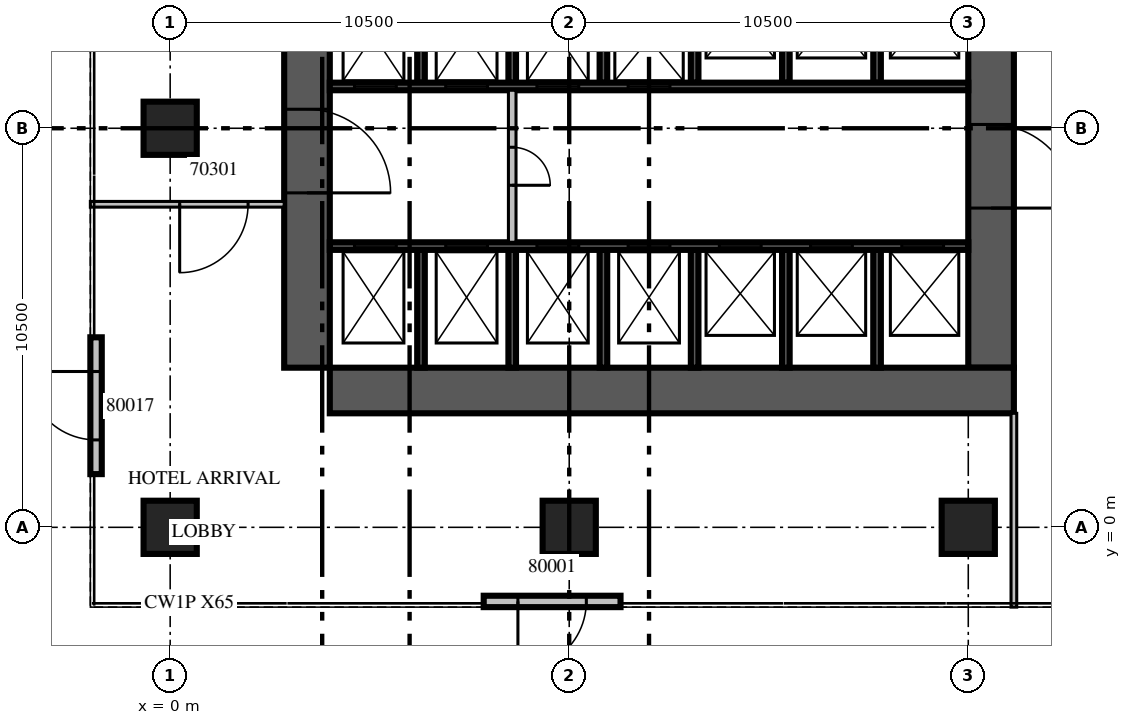
"""IFC4 building model, lengths in metres.
Left out: names, types, materials, properties, quantities, classifications, styles, units other than length and angle.
Written with IfcOpenShell. Run it as: python <this file> out.ifc"""

import sys

from ifc_helpers import new_model, si_unit, direction, frame, frame_2d, origin, origin_with_axes, origin_2d, place, context, subcontext, project, spatial, rectangle, extrude, source, transform, mapped, element, fill, save


model = new_model("IFC4")
c1 = context("Model", 3, precision=1e-05, world=origin(), true_north=direction((0.0, 1.0)))
c2 = subcontext(c1, "Body", "Model", "MODEL_VIEW")
j1 = project(units=[si_unit("LENGTHUNIT", "METRE"), si_unit("PLANEANGLEUNIT", "RADIAN")], contexts=[c1])
p1 = place(None, origin())
s1 = spatial("IfcSite", under=j1, at=p1, CompositionType="ELEMENT")
p2 = place(p1, origin())
s2 = spatial("IfcBuilding", under=s1, at=p2, CompositionType="ELEMENT")
p3 = place(p2, origin())
s3 = spatial("IfcBuildingStorey", under=s2, at=p3, CompositionType="ELEMENT", Elevation=0.0)
p4 = place(p3, origin_with_axes())
e1 = element("IfcColumn", 1, at=p4, inside=s3, PredefinedType="COLUMN", context=c2, shape_type="SweptSolid", body=[
    extrude(rectangle(XDim=1.4, YDim=1.4, at=origin_2d()), origin(), (0.0, 0.0, 1.0), 7.5),
])
m1 = source(origin(), c2, "Body", "SweptSolid", [
    extrude(rectangle(XDim=1.4, YDim=1.4, at=origin_2d()), origin(), (0.0, 0.0, 1.0), 7.5),
])
for number, where, z_axis, x_axis in (
    (2, (0.0, 10.5, 0.0), (0.0, 0.0, 1.0), (1.0, 0.0, 0.0)),
    (3, (10.5, 0.0, 0.0), (0.0, 0.0, 1.0), (1.0, 0.0, 0.0)),
    (4, (21.0, 0.0, 0.0), (0.0, 0.0, 1.0), (1.0, 0.0, 0.0)),
):
    element("IfcColumn", number, at=place(p3, frame(where, z_axis=z_axis, x_axis=x_axis)), inside=s3, PredefinedType="COLUMN", context=c2, shape_type="MappedRepresentation", body=[
        mapped(m1, transform((0.0, 0.0, 0.0), scale=1.0)),
    ])
p5 = place(p3, frame((3.6, 4.2, 0.0), z_axis=(0.0, 0.0, 1.0), x_axis=(0.0, 1.0, 0.0)))
e5 = element("IfcWall", 5, at=p5, inside=s3, PredefinedType="SHEAR", context=c2, shape_type="SweptSolid", body=[
    extrude(rectangle(XDim=18.0, YDim=1.2, at=frame_2d((9.0, 0.0))), origin(), (0.0, 0.0, 1.0), 7.5),
])
m2 = source(origin(), c2, "Body", "SweptSolid", [
    extrude(rectangle(XDim=2.2, YDim=2.1, at=frame_2d((1.1, 1.05))), frame((0.0, 0.61, 0.0), z_axis=(0.0, -1.0, 0.0), x_axis=(1.0, 0.0, 0.0)), (0.0, 0.0, 1.0), 1.22),
])
p6 = place(p5, frame((4.6, 0.0, 0.0)))
e6 = element("IfcOpeningElement", 6, at=p6, cuts=e5, PredefinedType="OPENING", context=c2, shape_type="MappedRepresentation", body=[
    mapped(m2, transform((0.0, 0.0, 0.0), scale=1.0)),
])
p7 = place(p5, frame((10.85, 0.0, 0.0)))
e7 = element("IfcOpeningElement", 7, at=p7, cuts=e5, PredefinedType="OPENING", context=c2, shape_type="SweptSolid", body=[
    extrude(rectangle(XDim=1.1, YDim=2.1, at=frame_2d((0.55, 1.05))), frame((0.0, 0.61, 0.0), z_axis=(0.0, -1.0, 0.0), x_axis=(1.0, 0.0, 0.0)), (0.0, 0.0, 1.0), 1.22),
])
p8 = place(p3, frame((21.6, 4.2, 0.0), z_axis=(0.0, 0.0, 1.0), x_axis=(0.0, 1.0, 0.0)))
e8 = element("IfcWall", 8, at=p8, inside=s3, PredefinedType="SHEAR", context=c2, shape_type="SweptSolid", body=[
    extrude(rectangle(XDim=16.8, YDim=1.2, at=frame_2d((8.4, 0.0))), origin(), (0.0, 0.0, 1.0), 7.5),
])
p9 = place(p8, frame((4.2, 0.0, 0.0)))
e9 = element("IfcOpeningElement", 9, at=p9, cuts=e8, PredefinedType="OPENING", context=c2, shape_type="MappedRepresentation", body=[
    mapped(m2, transform((0.0, 0.0, 0.0), scale=1.0)),
])
m3 = source(origin(), c2, "Body", "SweptSolid", [
    extrude(rectangle(XDim=1.2, YDim=2.1, at=frame_2d((0.6, 1.05))), frame((0.0, 0.61, 0.0), z_axis=(0.0, -1.0, 0.0), x_axis=(1.0, 0.0, 0.0)), (0.0, 0.0, 1.0), 1.22),
])
p10 = place(p8, frame((14.7, 0.0, 0.0)))
e10 = element("IfcOpeningElement", 10, at=p10, cuts=e8, PredefinedType="OPENING", context=c2, shape_type="MappedRepresentation", body=[
    mapped(m3, transform((0.0, 0.0, 0.0), scale=1.0)),
])
m4 = source(origin(), c2, "Body", "SweptSolid", [
    extrude(rectangle(XDim=18.0, YDim=1.2, at=frame_2d((9.0, 0.0))), origin(), (0.0, 0.0, 1.0), 7.5),
])
p11 = place(p3, frame((4.2, 3.6, 0.0), z_axis=(0.0, 0.0, 1.0), x_axis=(1.0, 0.0, 0.0)))
e11 = element("IfcWall", 11, at=p11, inside=s3, PredefinedType="SHEAR", context=c2, shape_type="MappedRepresentation", body=[
    mapped(m4, transform((0.0, 0.0, 0.0), scale=1.0)),
])
p12 = place(p3, frame((8.25, -1.95, 0.0), z_axis=(0.0, 0.0, 1.0), x_axis=(1.0, 0.0, 0.0)))
e12 = element("IfcWall", 12, at=p12, inside=s3, PredefinedType="STANDARD", context=c2, shape_type="SweptSolid", body=[
    extrude(rectangle(XDim=3.6, YDim=0.3, at=frame_2d((1.8, 0.0))), origin(), (0.0, 0.0, 1.0), 6.9),
])
p13 = place(p12, frame((0.9, 0.0, 0.0)))
e13 = element("IfcOpeningElement", 13, at=p13, cuts=e12, PredefinedType="OPENING", context=c2, shape_type="SweptSolid", body=[
    extrude(rectangle(XDim=1.8, YDim=2.4, at=frame_2d((0.9, 1.2))), frame((0.0, 0.16, 0.0), z_axis=(0.0, -1.0, 0.0), x_axis=(1.0, 0.0, 0.0)), (0.0, 0.0, 1.0), 0.32),
])
m5 = source(origin(), c2, "Body", "SweptSolid", [
    extrude(rectangle(XDim=3.6, YDim=0.3, at=frame_2d((1.8, 0.0))), origin(), (0.0, 0.0, 1.0), 6.9),
])
p14 = place(p3, frame((-1.95, 5.0, 0.0), z_axis=(0.0, 0.0, 1.0), x_axis=(0.0, -1.0, 0.0)))
e14 = element("IfcWall", 14, at=p14, inside=s3, PredefinedType="STANDARD", context=c2, shape_type="MappedRepresentation", body=[
    mapped(m5, transform((0.0, 0.0, 0.0), scale=1.0)),
])
m6 = source(origin(), c2, "Body", "SweptSolid", [
    extrude(rectangle(XDim=1.8, YDim=2.4, at=frame_2d((0.9, 1.2))), frame((0.0, 0.16, 0.0), z_axis=(0.0, -1.0, 0.0), x_axis=(1.0, 0.0, 0.0)), (0.0, 0.0, 1.0), 0.32),
])
p15 = place(p14, frame((0.9, 0.0, 0.0)))
e15 = element("IfcOpeningElement", 15, at=p15, cuts=e14, PredefinedType="OPENING", context=c2, shape_type="MappedRepresentation", body=[
    mapped(m6, transform((0.0, 0.0, 0.0), scale=1.0)),
])
p16 = place(p3, frame((6.6, 4.2, 0.0), z_axis=(0.0, 0.0, 1.0), x_axis=(0.0, 1.0, 0.0)))
e16 = element("IfcWall", 16, at=p16, inside=s3, PredefinedType="SOLIDWALL", context=c2, shape_type="SweptSolid", body=[
    extrude(rectangle(XDim=3.1, YDim=0.2, at=frame_2d((1.55, 0.0))), origin(), (0.0, 0.0, 1.0), 7.5),
])
m7 = source(origin(), c2, "Body", "SweptSolid", [
    extrude(rectangle(XDim=3.1, YDim=0.2, at=frame_2d((1.55, 0.0))), origin(), (0.0, 0.0, 1.0), 7.5),
])
for number, where, z_axis, x_axis in (
    (17, (9.0, 4.2, 0.0), (0.0, 0.0, 1.0), (0.0, 1.0, 0.0)),
    (18, (11.4, 4.2, 0.0), (0.0, 0.0, 1.0), (0.0, 1.0, 0.0)),
    (19, (13.8, 4.2, 0.0), (0.0, 0.0, 1.0), (0.0, 1.0, 0.0)),
    (20, (16.2, 4.2, 0.0), (0.0, 0.0, 1.0), (0.0, 1.0, 0.0)),
    (21, (18.6, 4.2, 0.0), (0.0, 0.0, 1.0), (0.0, 1.0, 0.0)),
):
    element("IfcWall", number, at=place(p3, frame(where, z_axis=z_axis, x_axis=x_axis)), inside=s3, PredefinedType="SOLIDWALL", context=c2, shape_type="MappedRepresentation", body=[
        mapped(m7, transform((0.0, 0.0, 0.0), scale=1.0)),
    ])
p17 = place(p3, frame((6.6, 11.7, 0.0), z_axis=(0.0, 0.0, 1.0), x_axis=(0.0, 1.0, 0.0)))
e22 = element("IfcWall", 22, at=p17, inside=s3, PredefinedType="SOLIDWALL", context=c2, shape_type="SweptSolid", body=[
    extrude(rectangle(XDim=3.0, YDim=0.2, at=frame_2d((1.5, 0.0))), origin(), (0.0, 0.0, 1.0), 7.5),
])
m8 = source(origin(), c2, "Body", "SweptSolid", [
    extrude(rectangle(XDim=3.0, YDim=0.2, at=frame_2d((1.5, 0.0))), origin(), (0.0, 0.0, 1.0), 7.5),
])
for number, where, z_axis, x_axis in (
    (23, (9.0, 11.7, 0.0), (0.0, 0.0, 1.0), (0.0, 1.0, 0.0)),
    (24, (11.4, 11.7, 0.0), (0.0, 0.0, 1.0), (0.0, 1.0, 0.0)),
    (25, (13.8, 11.7, 0.0), (0.0, 0.0, 1.0), (0.0, 1.0, 0.0)),
    (26, (16.2, 11.7, 0.0), (0.0, 0.0, 1.0), (0.0, 1.0, 0.0)),
    (27, (18.6, 11.7, 0.0), (0.0, 0.0, 1.0), (0.0, 1.0, 0.0)),
):
    element("IfcWall", number, at=place(p3, frame(where, z_axis=z_axis, x_axis=x_axis)), inside=s3, PredefinedType="SOLIDWALL", context=c2, shape_type="MappedRepresentation", body=[
        mapped(m8, transform((0.0, 0.0, 0.0), scale=1.0)),
    ])
p18 = place(p3, frame((4.2, 7.4, 0.0), z_axis=(0.0, 0.0, 1.0), x_axis=(1.0, 0.0, 0.0)))
e28 = element("IfcWall", 28, at=p18, inside=s3, PredefinedType="SOLIDWALL", context=c2, shape_type="SweptSolid", body=[
    extrude(rectangle(XDim=16.8, YDim=0.2, at=frame_2d((8.4, 0.0))), origin(), (0.0, 0.0, 1.0), 7.5),
])
m9 = source(origin(), c2, "Body", "SweptSolid", [
    extrude(rectangle(XDim=1.1, YDim=2.1, at=frame_2d((0.55, 1.05))), frame((0.0, 0.11, 0.0), z_axis=(0.0, -1.0, 0.0), x_axis=(1.0, 0.0, 0.0)), (0.0, 0.0, 1.0), 0.22),
])
p19 = place(p18, frame((0.65, 0.0, 0.0)))
e29 = element("IfcOpeningElement", 29, at=p19, cuts=e28, PredefinedType="OPENING", context=c2, shape_type="MappedRepresentation", body=[
    mapped(m9, transform((0.0, 0.0, 0.0), scale=1.0)),
])
p20 = place(p18, frame((3.05, 0.0, 0.0)))
e30 = element("IfcOpeningElement", 30, at=p20, cuts=e28, PredefinedType="OPENING", context=c2, shape_type="MappedRepresentation", body=[
    mapped(m9, transform((0.0, 0.0, 0.0), scale=1.0)),
])
p21 = place(p18, frame((5.45, 0.0, 0.0)))
e31 = element("IfcOpeningElement", 31, at=p21, cuts=e28, PredefinedType="OPENING", context=c2, shape_type="MappedRepresentation", body=[
    mapped(m9, transform((0.0, 0.0, 0.0), scale=1.0)),
])
p22 = place(p18, frame((7.85, 0.0, 0.0)))
e32 = element("IfcOpeningElement", 32, at=p22, cuts=e28, PredefinedType="OPENING", context=c2, shape_type="MappedRepresentation", body=[
    mapped(m9, transform((0.0, 0.0, 0.0), scale=1.0)),
])
p23 = place(p18, frame((10.25, 0.0, 0.0)))
e33 = element("IfcOpeningElement", 33, at=p23, cuts=e28, PredefinedType="OPENING", context=c2, shape_type="MappedRepresentation", body=[
    mapped(m9, transform((0.0, 0.0, 0.0), scale=1.0)),
])
p24 = place(p18, frame((12.65, 0.0, 0.0)))
e34 = element("IfcOpeningElement", 34, at=p24, cuts=e28, PredefinedType="OPENING", context=c2, shape_type="MappedRepresentation", body=[
    mapped(m9, transform((0.0, 0.0, 0.0), scale=1.0)),
])
p25 = place(p18, frame((15.05, 0.0, 0.0)))
e35 = element("IfcOpeningElement", 35, at=p25, cuts=e28, PredefinedType="OPENING", context=c2, shape_type="MappedRepresentation", body=[
    mapped(m9, transform((0.0, 0.0, 0.0), scale=1.0)),
])
m10 = source(origin(), c2, "Body", "SweptSolid", [
    extrude(rectangle(XDim=16.8, YDim=0.2, at=frame_2d((8.4, 0.0))), origin(), (0.0, 0.0, 1.0), 7.5),
])
p26 = place(p3, frame((4.2, 11.6, 0.0), z_axis=(0.0, 0.0, 1.0), x_axis=(1.0, 0.0, 0.0)))
e36 = element("IfcWall", 36, at=p26, inside=s3, PredefinedType="SOLIDWALL", context=c2, shape_type="MappedRepresentation", body=[
    mapped(m10, transform((0.0, 0.0, 0.0), scale=1.0)),
])
p27 = place(p26, frame((0.65, 0.0, 0.0)))
e37 = element("IfcOpeningElement", 37, at=p27, cuts=e36, PredefinedType="OPENING", context=c2, shape_type="MappedRepresentation", body=[
    mapped(m9, transform((0.0, 0.0, 0.0), scale=1.0)),
])
p28 = place(p26, frame((3.05, 0.0, 0.0)))
e38 = element("IfcOpeningElement", 38, at=p28, cuts=e36, PredefinedType="OPENING", context=c2, shape_type="MappedRepresentation", body=[
    mapped(m9, transform((0.0, 0.0, 0.0), scale=1.0)),
])
p29 = place(p26, frame((5.45, 0.0, 0.0)))
e39 = element("IfcOpeningElement", 39, at=p29, cuts=e36, PredefinedType="OPENING", context=c2, shape_type="MappedRepresentation", body=[
    mapped(m9, transform((0.0, 0.0, 0.0), scale=1.0)),
])
p30 = place(p26, frame((7.85, 0.0, 0.0)))
e40 = element("IfcOpeningElement", 40, at=p30, cuts=e36, PredefinedType="OPENING", context=c2, shape_type="MappedRepresentation", body=[
    mapped(m9, transform((0.0, 0.0, 0.0), scale=1.0)),
])
p31 = place(p3, frame((9.0, 7.5, 0.0), z_axis=(0.0, 0.0, 1.0), x_axis=(0.0, 1.0, 0.0)))
e41 = element("IfcWall", 41, at=p31, inside=s3, PredefinedType="PARTITIONING", context=c2, shape_type="SweptSolid", body=[
    extrude(rectangle(XDim=4.0, YDim=0.2, at=frame_2d((2.0, 0.0))), origin(), (0.0, 0.0, 1.0), 6.9),
])
p32 = place(p31, frame((1.5, 0.0, 0.0)))
e42 = element("IfcOpeningElement", 42, at=p32, cuts=e41, PredefinedType="OPENING", context=c2, shape_type="SweptSolid", body=[
    extrude(rectangle(XDim=1.0, YDim=2.1, at=frame_2d((0.5, 1.05))), frame((0.0, 0.11, 0.0), z_axis=(0.0, -1.0, 0.0), x_axis=(1.0, 0.0, 0.0)), (0.0, 0.0, 1.0), 0.22),
])
p33 = place(p3, frame((-2.1, 8.5, 0.0), z_axis=(0.0, 0.0, 1.0), x_axis=(1.0, 0.0, 0.0)))
e43 = element("IfcWall", 43, at=p33, inside=s3, PredefinedType="PARTITIONING", context=c2, shape_type="SweptSolid", body=[
    extrude(rectangle(XDim=5.1, YDim=0.15, at=frame_2d((2.55, 0.0))), origin(), (0.0, 0.0, 1.0), 6.9),
])
p34 = place(p33, frame((2.35, 0.0, 0.0)))
e44 = element("IfcOpeningElement", 44, at=p34, cuts=e43, PredefinedType="OPENING", context=c2, shape_type="SweptSolid", body=[
    extrude(rectangle(XDim=1.8, YDim=2.1, at=frame_2d((0.9, 1.05))), frame((0.0, 0.085, 0.0), z_axis=(0.0, -1.0, 0.0), x_axis=(1.0, 0.0, 0.0)), (0.0, 0.0, 1.0), 0.17),
])
m11 = source(origin(), c2, "Body", "SweptSolid", [
    extrude(rectangle(XDim=5.1, YDim=0.15, at=frame_2d((2.55, 0.0))), origin(), (0.0, 0.0, 1.0), 6.9),
])
p35 = place(p3, frame((22.2, -2.1, 0.0), z_axis=(0.0, 0.0, 1.0), x_axis=(0.0, 1.0, 0.0)))
e45 = element("IfcWall", 45, at=p35, inside=s3, PredefinedType="PARTITIONING", context=c2, shape_type="MappedRepresentation", body=[
    mapped(m11, transform((0.0, 0.0, 0.0), scale=1.0)),
])
p36 = place(p13, origin())
e46 = element("IfcDoor", 46, at=p36, inside=s3, OperationType="DOUBLE_DOOR_SINGLE_SWING", PredefinedType="DOOR", context=c2, shape_type="SweptSolid", body=[
    extrude(rectangle(XDim=1.8, YDim=2.4, at=frame_2d((0.9, 1.2))), frame((0.0, 0.025, 0.0), z_axis=(0.0, -1.0, 0.0), x_axis=(1.0, 0.0, 0.0)), (0.0, 0.0, 1.0), 0.05),
])
fill(e13, e46)
m12 = source(origin(), c2, "Body", "SweptSolid", [
    extrude(rectangle(XDim=1.8, YDim=2.4, at=frame_2d((0.9, 1.2))), frame((0.0, 0.025, 0.0), z_axis=(0.0, -1.0, 0.0), x_axis=(1.0, 0.0, 0.0)), (0.0, 0.0, 1.0), 0.05),
])
p37 = place(p15, origin())
e47 = element("IfcDoor", 47, at=p37, inside=s3, OperationType="DOUBLE_DOOR_SINGLE_SWING", PredefinedType="DOOR", context=c2, shape_type="MappedRepresentation", body=[
    mapped(m12, transform((0.0, 0.0, 0.0), scale=1.0)),
])
fill(e15, e47)
m13 = source(origin(), c2, "Body", "SweptSolid", [
    extrude(rectangle(XDim=1.1, YDim=2.1, at=frame_2d((0.55, 1.05))), frame((0.0, 0.025, 0.0), z_axis=(0.0, -1.0, 0.0), x_axis=(1.0, 0.0, 0.0)), (0.0, 0.0, 1.0), 0.05),
])
p38 = place(p19, origin())
e48 = element("IfcDoor", 48, at=p38, inside=s3, OperationType="SLIDING_TO_LEFT", PredefinedType="DOOR", context=c2, shape_type="MappedRepresentation", body=[
    mapped(m13, transform((0.0, 0.0, 0.0), scale=1.0)),
])
fill(e29, e48)
p39 = place(p20, origin())
e49 = element("IfcDoor", 49, at=p39, inside=s3, OperationType="SLIDING_TO_LEFT", PredefinedType="DOOR", context=c2, shape_type="MappedRepresentation", body=[
    mapped(m13, transform((0.0, 0.0, 0.0), scale=1.0)),
])
fill(e30, e49)
p40 = place(p21, origin())
e50 = element("IfcDoor", 50, at=p40, inside=s3, OperationType="SLIDING_TO_LEFT", PredefinedType="DOOR", context=c2, shape_type="MappedRepresentation", body=[
    mapped(m13, transform((0.0, 0.0, 0.0), scale=1.0)),
])
fill(e31, e50)
p41 = place(p22, origin())
e51 = element("IfcDoor", 51, at=p41, inside=s3, OperationType="SLIDING_TO_LEFT", PredefinedType="DOOR", context=c2, shape_type="MappedRepresentation", body=[
    mapped(m13, transform((0.0, 0.0, 0.0), scale=1.0)),
])
fill(e32, e51)
p42 = place(p23, origin())
e52 = element("IfcDoor", 52, at=p42, inside=s3, OperationType="SLIDING_TO_LEFT", PredefinedType="DOOR", context=c2, shape_type="MappedRepresentation", body=[
    mapped(m13, transform((0.0, 0.0, 0.0), scale=1.0)),
])
fill(e33, e52)
p43 = place(p24, origin())
e53 = element("IfcDoor", 53, at=p43, inside=s3, OperationType="SLIDING_TO_LEFT", PredefinedType="DOOR", context=c2, shape_type="MappedRepresentation", body=[
    mapped(m13, transform((0.0, 0.0, 0.0), scale=1.0)),
])
fill(e34, e53)
p44 = place(p25, origin())
e54 = element("IfcDoor", 54, at=p44, inside=s3, OperationType="SLIDING_TO_LEFT", PredefinedType="DOOR", context=c2, shape_type="MappedRepresentation", body=[
    mapped(m13, transform((0.0, 0.0, 0.0), scale=1.0)),
])
fill(e35, e54)
p45 = place(p27, origin())
e55 = element("IfcDoor", 55, at=p45, inside=s3, OperationType="SLIDING_TO_LEFT", PredefinedType="DOOR", context=c2, shape_type="MappedRepresentation", body=[
    mapped(m13, transform((0.0, 0.0, 0.0), scale=1.0)),
])
fill(e37, e55)
p46 = place(p28, origin())
e56 = element("IfcDoor", 56, at=p46, inside=s3, OperationType="SLIDING_TO_LEFT", PredefinedType="DOOR", context=c2, shape_type="MappedRepresentation", body=[
    mapped(m13, transform((0.0, 0.0, 0.0), scale=1.0)),
])
fill(e38, e56)
p47 = place(p29, origin())
e57 = element("IfcDoor", 57, at=p47, inside=s3, OperationType="SLIDING_TO_LEFT", PredefinedType="DOOR", context=c2, shape_type="MappedRepresentation", body=[
    mapped(m13, transform((0.0, 0.0, 0.0), scale=1.0)),
])
fill(e39, e57)
p48 = place(p30, origin())
e58 = element("IfcDoor", 58, at=p48, inside=s3, OperationType="SLIDING_TO_LEFT", PredefinedType="DOOR", context=c2, shape_type="MappedRepresentation", body=[
    mapped(m13, transform((0.0, 0.0, 0.0), scale=1.0)),
])
fill(e40, e58)
m14 = source(origin(), c2, "Body", "SweptSolid", [
    extrude(rectangle(XDim=1.0, YDim=2.1, at=frame_2d((0.5, 1.05))), frame((0.0, 0.025, 0.0), z_axis=(0.0, -1.0, 0.0), x_axis=(1.0, 0.0, 0.0)), (0.0, 0.0, 1.0), 0.05),
])
p49 = place(p32, origin())
e59 = element("IfcDoor", 59, at=p49, inside=s3, OperationType="SINGLE_SWING_RIGHT", PredefinedType="DOOR", context=c2, shape_type="MappedRepresentation", body=[
    mapped(m14, transform((0.0, 0.0, 0.0), scale=1.0)),
])
fill(e42, e59)
m15 = source(origin(), c2, "Body", "SweptSolid", [
    extrude(rectangle(XDim=2.2, YDim=2.1, at=frame_2d((1.1, 1.05))), frame((0.0, 0.025, 0.0), z_axis=(0.0, -1.0, 0.0), x_axis=(1.0, 0.0, 0.0)), (0.0, 0.0, 1.0), 0.05),
])
p50 = place(p9, origin())
e60 = element("IfcDoor", 60, at=p50, inside=s3, OperationType="DOUBLE_DOOR_SINGLE_SWING", PredefinedType="DOOR", context=c2, shape_type="MappedRepresentation", body=[
    mapped(m15, transform((0.0, 0.0, 0.0), scale=1.0)),
])
fill(e9, e60)
p51 = place(p6, origin())
e61 = element("IfcDoor", 61, at=p51, inside=s3, OperationType="DOUBLE_DOOR_SINGLE_SWING", PredefinedType="DOOR", context=c2, shape_type="MappedRepresentation", body=[
    mapped(m15, transform((0.0, 0.0, 0.0), scale=1.0)),
])
fill(e6, e61)
m16 = source(origin(), c2, "Body", "SweptSolid", [
    extrude(rectangle(XDim=1.8, YDim=2.1, at=frame_2d((0.9, 1.05))), frame((0.0, 0.025, 0.0), z_axis=(0.0, -1.0, 0.0), x_axis=(1.0, 0.0, 0.0)), (0.0, 0.0, 1.0), 0.05),
])
p52 = place(p34, origin())
e62 = element("IfcDoor", 62, at=p52, inside=s3, OperationType="DOUBLE_DOOR_SINGLE_SWING", PredefinedType="DOOR", context=c2, shape_type="MappedRepresentation", body=[
    mapped(m16, transform((0.0, 0.0, 0.0), scale=1.0)),
])
fill(e44, e62)
save(model, sys.argv[1])
